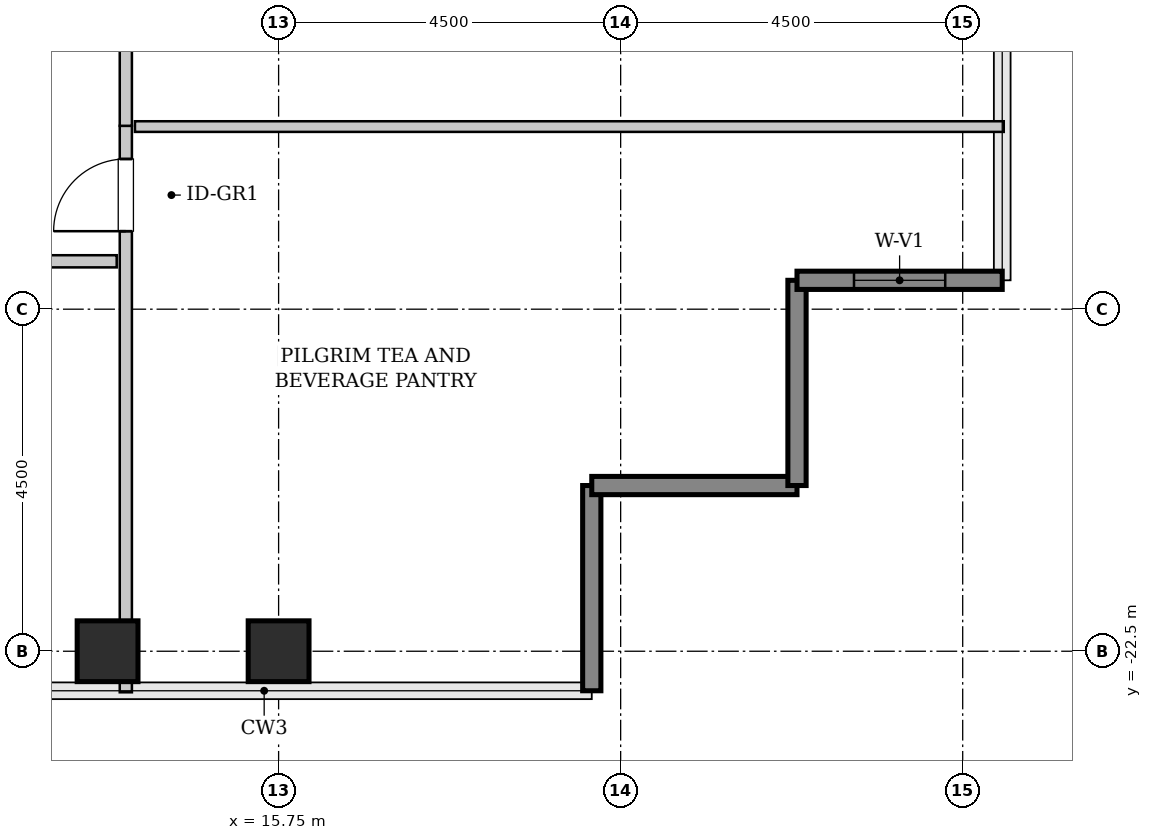
"""IFC4 building model, lengths in metres.
Left out: names, types, materials, properties, quantities, classifications, styles, units other than length and angle.
Written with IfcOpenShell. Run it as: python <this file> out.ifc"""

import sys

from ifc_helpers import new_model, si_unit, direction, frame, frame_2d, origin, origin_2d, place, context, subcontext, project, spatial, rectangle, hollow_rectangle, extrude, source, transform, mapped, element, fill, save


model = new_model("IFC4")
c1 = context("Model", 3, precision=1e-05, world=origin(), true_north=direction((0.0, 1.0)))
c2 = subcontext(c1, "Body", "Model", "MODEL_VIEW")
j1 = project(units=[si_unit("LENGTHUNIT", "METRE"), si_unit("PLANEANGLEUNIT", "RADIAN")], contexts=[c1])
p1 = place(None, origin())
s1 = spatial("IfcSite", under=j1, at=p1, CompositionType="ELEMENT")
p2 = place(p1, origin())
s2 = spatial("IfcBuilding", under=s1, at=p2, CompositionType="ELEMENT")
p3 = place(p2, frame((0.0, 0.0, 198.2)))
s3 = spatial("IfcBuildingStorey", under=s2, at=p3, CompositionType="ELEMENT", Elevation=198.2)
m1 = source(origin(), c2, "Body", "SweptSolid", [
    extrude(hollow_rectangle(XDim=0.8, YDim=0.8, WallThickness=0.04, InnerFilletRadius=0.04, OuterFilletRadius=0.08, at=origin_2d()), origin(), (0.0, 0.0, 1.0), 3.8),
])
for number, where, z_axis, x_axis in (
    (1, (13.5, -22.5, 0.0), (0.0, 0.0, 1.0), (1.0, 0.0, 0.0)),
    (2, (15.75, -22.5, 0.0), (0.0, 0.0, 1.0), (1.0, 0.0, 0.0)),
):
    element("IfcColumn", number, at=place(p3, frame(where, z_axis=z_axis, x_axis=x_axis)), inside=s3, PredefinedType="COLUMN", context=c2, shape_type="MappedRepresentation", body=[
        mapped(m1, transform((0.0, 0.0, 0.0), x_axis=(1.0, 0.0, 0.0), y_axis=(0.0, 1.0, 0.0), z_axis=(0.0, 0.0, 1.0), scale=1.0)),
    ])
m2 = source(origin(), c2, "Body", "SweptSolid", [
    extrude(rectangle(XDim=2.7, YDim=0.24, at=frame_2d((1.35, 0.0))), origin(), (0.0, 0.0, 1.0), 3.5),
])
for number, where, z_axis, x_axis in (
    (3, (19.87, -23.02, 0.0), (0.0, 0.0, 1.0), (0.0, 1.0, 0.0)),
    (4, (19.87, -20.32, 0.0), (0.0, 0.0, 1.0), (1.0, 0.0, 0.0)),
    (5, (22.57, -20.32, 0.0), (0.0, 0.0, 1.0), (0.0, 1.0, 0.0)),
):
    element("IfcWall", number, at=place(p3, frame(where, z_axis=z_axis, x_axis=x_axis)), inside=s3, PredefinedType="SHEAR", context=c2, shape_type="MappedRepresentation", body=[
        mapped(m2, transform((0.0, 0.0, 0.0), x_axis=(1.0, 0.0, 0.0), y_axis=(0.0, 1.0, 0.0), z_axis=(0.0, 0.0, 1.0), scale=1.0)),
    ])
p4 = place(p3, frame((22.57, -17.62, 0.0), z_axis=(0.0, 0.0, 1.0), x_axis=(1.0, 0.0, 0.0)))
e6 = element("IfcWall", 6, at=p4, inside=s3, PredefinedType="SHEAR", context=c2, shape_type="MappedRepresentation", body=[
    mapped(m2, transform((0.0, 0.0, 0.0), x_axis=(1.0, 0.0, 0.0), y_axis=(0.0, 1.0, 0.0), z_axis=(0.0, 0.0, 1.0), scale=1.0)),
])
p5 = place(p4, frame((0.75, 0.0, 0.85)))
e7 = element("IfcOpeningElement", 7, at=p5, cuts=e6, PredefinedType="OPENING", context=c2, shape_type="SweptSolid", body=[
    extrude(rectangle(XDim=1.2, YDim=1.8, at=frame_2d((0.6, 0.9))), frame((0.0, 0.13, 0.0), z_axis=(0.0, -1.0, 0.0), x_axis=(1.0, 0.0, 0.0)), (0.0, 0.0, 1.0), 0.26),
])
m3 = source(origin(), c2, "Body", "SweptSolid", [
    extrude(rectangle(XDim=7.453, YDim=0.16, at=frame_2d((3.726, 0.0))), origin(), (0.0, 0.0, 1.0), 3.485),
])
p6 = place(p3, frame((13.74, -23.04, 0.0), z_axis=(0.0, 0.0, 1.0), x_axis=(0.0, 1.0, 0.0)))
e8 = element("IfcWall", 8, at=p6, inside=s3, PredefinedType="PARTITIONING", context=c2, shape_type="MappedRepresentation", body=[
    mapped(m3, transform((0.0, 0.0, 0.0), x_axis=(1.0, 0.0, 0.0), y_axis=(0.0, 1.0, 0.0), z_axis=(0.0, 0.0, 1.0), scale=1.0)),
])
p7 = place(p6, frame((6.066, 0.0, 0.0)))
e9 = element("IfcOpeningElement", 9, at=p7, cuts=e8, PredefinedType="OPENING", context=c2, shape_type="SweptSolid", body=[
    extrude(rectangle(XDim=0.95, YDim=2.1, at=frame_2d((0.475, 1.05))), frame((0.0, 0.09, 0.0), z_axis=(0.0, -1.0, 0.0), x_axis=(1.0, 0.0, 0.0)), (0.0, 0.0, 1.0), 0.18),
])
m4 = source(origin(), c2, "Body", "SweptSolid", [
    extrude(rectangle(XDim=11.43, YDim=0.14, at=frame_2d((5.715, 0.0))), origin(), (0.0, 0.0, 1.0), 3.485),
])
p8 = place(p3, frame((13.86, -15.597, 0.0), z_axis=(0.0, 0.0, 1.0), x_axis=(1.0, 0.0, 0.0)))
e10 = element("IfcWall", 10, at=p8, inside=s3, PredefinedType="PARTITIONING", context=c2, shape_type="MappedRepresentation", body=[
    mapped(m4, transform((0.0, 0.0, 0.0), x_axis=(1.0, 0.0, 0.0), y_axis=(0.0, 1.0, 0.0), z_axis=(0.0, 0.0, 1.0), scale=1.0)),
])
m5 = source(origin(), c2, "Body", "SweptSolid", [
    extrude(rectangle(XDim=7.392, YDim=0.16, at=frame_2d((3.696, 0.0))), origin(), (0.0, 0.0, 1.0), 3.485),
])
p9 = place(p3, frame((13.74, -15.587, 0.0), z_axis=(0.0, 0.0, 1.0), x_axis=(0.0, 1.0, 0.0)))
e11 = element("IfcWall", 11, at=p9, inside=s3, PredefinedType="PARTITIONING", context=c2, shape_type="MappedRepresentation", body=[
    mapped(m5, transform((0.0, 0.0, 0.0), x_axis=(1.0, 0.0, 0.0), y_axis=(0.0, 1.0, 0.0), z_axis=(0.0, 0.0, 1.0), scale=1.0)),
])
p10 = place(p9, frame((3.221, 0.0, 0.0)))
e12 = element("IfcOpeningElement", 12, at=p10, cuts=e11, PredefinedType="OPENING", context=c2, shape_type="SweptSolid", body=[
    extrude(rectangle(XDim=0.95, YDim=2.1, at=frame_2d((0.475, 1.05))), frame((0.0, 0.09, 0.0), z_axis=(0.0, -1.0, 0.0), x_axis=(1.0, 0.0, 0.0)), (0.0, 0.0, 1.0), 0.18),
])
m6 = source(origin(), c2, "Body", "SweptSolid", [
    extrude(rectangle(XDim=9.025, YDim=0.16, at=frame_2d((4.513, 0.0))), origin(), (0.0, 0.0, 1.0), 3.485),
])
p11 = place(p3, frame((4.595, -17.37, 0.0), z_axis=(0.0, 0.0, 1.0), x_axis=(1.0, 0.0, 0.0)))
e13 = element("IfcWall", 13, at=p11, inside=s3, PredefinedType="PARTITIONING", context=c2, shape_type="MappedRepresentation", body=[
    mapped(m6, transform((0.0, 0.0, 0.0), x_axis=(1.0, 0.0, 0.0), y_axis=(0.0, 1.0, 0.0), z_axis=(0.0, 0.0, 1.0), scale=1.0)),
])
p12 = place(p11, frame((4.038, 0.0, 0.0)))
e14 = element("IfcOpeningElement", 14, at=p12, cuts=e13, PredefinedType="OPENING", context=c2, shape_type="SweptSolid", body=[
    extrude(rectangle(XDim=0.95, YDim=2.1, at=frame_2d((0.475, 1.05))), frame((0.0, 0.09, 0.0), z_axis=(0.0, -1.0, 0.0), x_axis=(1.0, 0.0, 0.0)), (0.0, 0.0, 1.0), 0.18),
])
m7 = source(origin(), c2, "Body", "SweptSolid", [
    extrude(rectangle(XDim=1.2, YDim=1.8, at=frame_2d((0.6, 0.9))), frame((0.0, 0.03, 0.0), z_axis=(0.0, -1.0, 0.0), x_axis=(1.0, 0.0, 0.0)), (0.0, 0.0, 1.0), 0.06),
])
p13 = place(p5, origin())
e15 = element("IfcWindow", 15, at=p13, inside=s3, PartitioningType="SINGLE_PANEL", PredefinedType="WINDOW", context=c2, shape_type="MappedRepresentation", body=[
    mapped(m7, transform((0.0, 0.0, 0.0), x_axis=(1.0, 0.0, 0.0), y_axis=(0.0, 1.0, 0.0), z_axis=(0.0, 0.0, 1.0), scale=1.0)),
])
fill(e7, e15)
m8 = source(origin(), c2, "Body", "SweptSolid", [
    extrude(rectangle(XDim=0.95, YDim=2.1, at=frame_2d((0.475, 1.05))), frame((0.0, 0.025, 0.0), z_axis=(0.0, -1.0, 0.0), x_axis=(1.0, 0.0, 0.0)), (0.0, 0.0, 1.0), 0.05),
])
p14 = place(p7, origin())
e16 = element("IfcDoor", 16, at=p14, inside=s3, OperationType="SINGLE_SWING_LEFT", PredefinedType="DOOR", context=c2, shape_type="MappedRepresentation", body=[
    mapped(m8, transform((0.0, 0.0, 0.0), x_axis=(1.0, 0.0, 0.0), y_axis=(0.0, 1.0, 0.0), z_axis=(0.0, 0.0, 1.0), scale=1.0)),
])
fill(e9, e16)
save(model, sys.argv[1])
